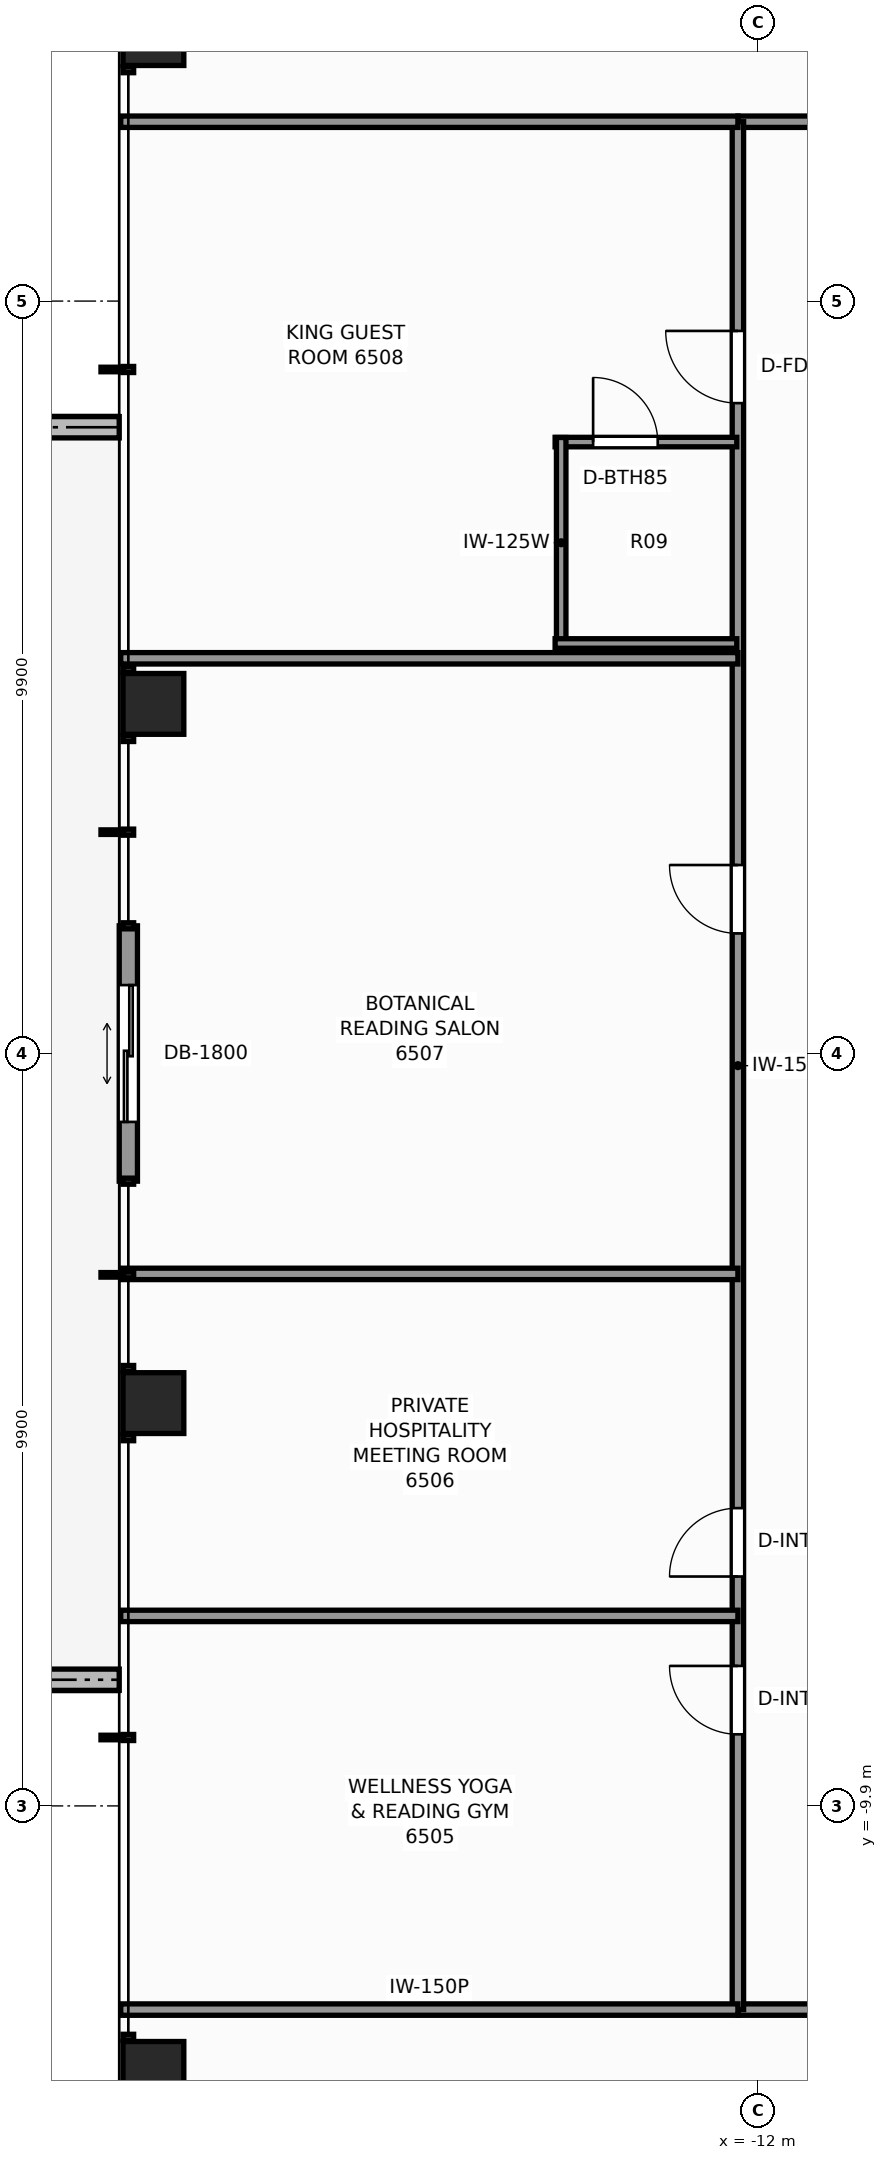
"""IFC4 building model, lengths in metres.
Left out: names, types, materials, properties, quantities, classifications, styles, units other than length and angle.
Written with IfcOpenShell. Run it as: python <this file> out.ifc"""

import sys

from ifc_helpers import new_model, si_unit, direction, frame, frame_2d, origin, origin_2d, place, context, subcontext, project, spatial, rectangle, extrude, element, fill, save


model = new_model("IFC4")
c1 = context("Model", 3, precision=1e-05, world=origin(), true_north=direction((0.0, 1.0)))
c2 = subcontext(c1, "Body", "Model", "MODEL_VIEW")
j1 = project(units=[si_unit("LENGTHUNIT", "METRE"), si_unit("PLANEANGLEUNIT", "RADIAN")], contexts=[c1])
p1 = place(None, origin())
s1 = spatial("IfcSite", under=j1, at=p1, CompositionType="ELEMENT")
p2 = place(p1, origin())
s2 = spatial("IfcBuilding", under=s1, at=p2, CompositionType="ELEMENT")
p3 = place(p2, frame((0.0, 0.0, 222.9)))
s3 = spatial("IfcBuildingStorey", under=s2, at=p3, CompositionType="ELEMENT", Elevation=222.9)
for number, where, z_axis, x_axis in (
    (1, (-19.95, -13.4, 0.0), (0.0, 0.0, 1.0), (1.0, 0.0, 0.0)),
    (2, (-19.95, -4.6, 0.0), (0.0, 0.0, 1.0), (1.0, 0.0, 0.0)),
    (3, (-19.95, 4.6, 0.0), (0.0, 0.0, 1.0), (1.0, 0.0, 0.0)),
    (4, (-19.95, 13.4, 0.0), (0.0, 0.0, 1.0), (1.0, 0.0, 0.0)),
):
    element("IfcColumn", number, at=place(p3, frame(where, z_axis=z_axis, x_axis=x_axis)), inside=s3, PredefinedType="COLUMN", context=c2, shape_type="SweptSolid", body=[
        extrude(rectangle(XDim=0.8, YDim=0.8, at=origin_2d()), origin(), (0.0, 0.0, 1.0), 3.3),
    ])
p4 = place(p3, frame((-21.66, -8.24, -0.04), z_axis=(0.0, 0.0, 1.0), x_axis=(1.0, 0.0, 0.0)))
e5 = element("IfcWall", 5, at=p4, inside=s3, PredefinedType="PARAPET", context=c2, shape_type="SweptSolid", body=[
    extrude(rectangle(XDim=1.26, YDim=0.28, at=frame_2d((0.63, 0.0))), origin(), (0.0, 0.0, 1.0), 0.42),
])
p5 = place(p3, frame((-20.4, 8.24, -0.04), z_axis=(0.0, 0.0, 1.0), x_axis=(-1.0, 0.0, 0.0)))
e6 = element("IfcWall", 6, at=p5, inside=s3, PredefinedType="PARAPET", context=c2, shape_type="SweptSolid", body=[
    extrude(rectangle(XDim=2.006, YDim=0.28, at=frame_2d((1.003, 0.0))), origin(), (0.0, 0.0, 1.0), 0.42),
])
p6 = place(p3, frame((-20.28, -1.68, 0.0), z_axis=(0.0, 0.0, 1.0), x_axis=(0.0, 1.0, 0.0)))
e7 = element("IfcWall", 7, at=p6, inside=s3, PredefinedType="STANDARD", context=c2, shape_type="SweptSolid", body=[
    extrude(rectangle(XDim=3.36, YDim=0.24, at=frame_2d((1.68, 0.0))), origin(), (0.0, 0.0, 1.0), 3.08),
])
p7 = place(p6, frame((0.78, 0.0, 0.0)))
e8 = element("IfcOpeningElement", 8, at=p7, cuts=e7, PredefinedType="OPENING", context=c2, shape_type="SweptSolid", body=[
    extrude(rectangle(XDim=1.8, YDim=2.2, at=frame_2d((0.9, 1.1))), frame((0.0, 0.13, 0.0), z_axis=(0.0, -1.0, 0.0), x_axis=(1.0, 0.0, 0.0)), (0.0, 0.0, 1.0), 0.26),
])
p8 = place(p3, frame((-12.26, -12.58, 0.0), z_axis=(0.0, 0.0, 1.0), x_axis=(1.0, 0.0, 0.0)))
e9 = element("IfcWall", 9, at=p8, inside=s3, PredefinedType="PARTITIONING", context=c2, shape_type="SweptSolid", body=[
    extrude(rectangle(XDim=24.52, YDim=0.15, at=frame_2d((12.26, 0.0))), origin(), (0.0, 0.0, 1.0), 2.369),
])
p9 = place(p8, frame((4.275, 0.0, 0.0)))
e10 = element("IfcOpeningElement", 10, at=p9, cuts=e9, PredefinedType="OPENING", context=c2, shape_type="SweptSolid", body=[
    extrude(rectangle(XDim=0.9, YDim=2.06, at=frame_2d((0.45, 1.03))), frame((0.0, 0.085, 0.0), z_axis=(0.0, -1.0, 0.0), x_axis=(1.0, 0.0, 0.0)), (0.0, 0.0, 1.0), 0.17),
])
p10 = place(p8, frame((19.345, 0.0, 0.0)))
e11 = element("IfcOpeningElement", 11, at=p10, cuts=e9, PredefinedType="OPENING", context=c2, shape_type="SweptSolid", body=[
    extrude(rectangle(XDim=0.9, YDim=2.06, at=frame_2d((0.45, 1.03))), frame((0.0, 0.085, 0.0), z_axis=(0.0, -1.0, 0.0), x_axis=(1.0, 0.0, 0.0)), (0.0, 0.0, 1.0), 0.17),
])
p11 = place(p3, frame((-12.26, 12.26, 0.0), z_axis=(0.0, 0.0, 1.0), x_axis=(1.0, 0.0, 0.0)))
e12 = element("IfcWall", 12, at=p11, inside=s3, PredefinedType="PARTITIONING", context=c2, shape_type="SweptSolid", body=[
    extrude(rectangle(XDim=24.52, YDim=0.15, at=frame_2d((12.26, 0.0))), origin(), (0.0, 0.0, 1.0), 2.369),
])
p12 = place(p11, frame((2.916, 0.0, 0.0)))
e13 = element("IfcOpeningElement", 13, at=p12, cuts=e12, PredefinedType="OPENING", context=c2, shape_type="SweptSolid", body=[
    extrude(rectangle(XDim=0.9, YDim=2.06, at=frame_2d((0.45, 1.03))), frame((0.0, 0.085, 0.0), z_axis=(0.0, -1.0, 0.0), x_axis=(1.0, 0.0, 0.0)), (0.0, 0.0, 1.0), 0.17),
])
p13 = place(p11, frame((9.755, 0.0, 0.0)))
e14 = element("IfcOpeningElement", 14, at=p13, cuts=e12, PredefinedType="OPENING", context=c2, shape_type="SweptSolid", body=[
    extrude(rectangle(XDim=0.95, YDim=2.06, at=frame_2d((0.475, 1.03))), frame((0.0, 0.085, 0.0), z_axis=(0.0, -1.0, 0.0), x_axis=(1.0, 0.0, 0.0)), (0.0, 0.0, 1.0), 0.17),
])
p14 = place(p11, frame((19.345, 0.0, 0.0)))
e15 = element("IfcOpeningElement", 15, at=p14, cuts=e12, PredefinedType="OPENING", context=c2, shape_type="SweptSolid", body=[
    extrude(rectangle(XDim=0.9, YDim=2.06, at=frame_2d((0.45, 1.03))), frame((0.0, 0.085, 0.0), z_axis=(0.0, -1.0, 0.0), x_axis=(1.0, 0.0, 0.0)), (0.0, 0.0, 1.0), 0.17),
])
p15 = place(p3, frame((-12.26, -12.58, 0.0), z_axis=(0.0, 0.0, 1.0), x_axis=(0.0, 1.0, 0.0)))
e16 = element("IfcWall", 16, at=p15, inside=s3, PredefinedType="PARTITIONING", context=c2, shape_type="SweptSolid", body=[
    extrude(rectangle(XDim=24.84, YDim=0.15, at=frame_2d((12.42, 0.0))), origin(), (0.0, 0.0, 1.0), 2.369),
])
p16 = place(p15, frame((3.622, 0.0, 0.0)))
e17 = element("IfcOpeningElement", 17, at=p16, cuts=e16, PredefinedType="OPENING", context=c2, shape_type="SweptSolid", body=[
    extrude(rectangle(XDim=0.9, YDim=2.06, at=frame_2d((0.45, 1.03))), frame((0.0, 0.085, 0.0), z_axis=(0.0, -1.0, 0.0), x_axis=(1.0, 0.0, 0.0)), (0.0, 0.0, 1.0), 0.17),
])
p17 = place(p15, frame((5.698, 0.0, 0.0)))
e18 = element("IfcOpeningElement", 18, at=p17, cuts=e16, PredefinedType="OPENING", context=c2, shape_type="SweptSolid", body=[
    extrude(rectangle(XDim=0.9, YDim=2.06, at=frame_2d((0.45, 1.03))), frame((0.0, 0.085, 0.0), z_axis=(0.0, -1.0, 0.0), x_axis=(1.0, 0.0, 0.0)), (0.0, 0.0, 1.0), 0.17),
])
p18 = place(p15, frame((14.16, 0.0, 0.0)))
e19 = element("IfcOpeningElement", 19, at=p18, cuts=e16, PredefinedType="OPENING", context=c2, shape_type="SweptSolid", body=[
    extrude(rectangle(XDim=0.9, YDim=2.06, at=frame_2d((0.45, 1.03))), frame((0.0, 0.085, 0.0), z_axis=(0.0, -1.0, 0.0), x_axis=(1.0, 0.0, 0.0)), (0.0, 0.0, 1.0), 0.17),
])
p19 = place(p15, frame((21.137, 0.0, 0.0)))
e20 = element("IfcOpeningElement", 20, at=p19, cuts=e16, PredefinedType="OPENING", context=c2, shape_type="SweptSolid", body=[
    extrude(rectangle(XDim=0.95, YDim=2.06, at=frame_2d((0.475, 1.03))), frame((0.0, 0.085, 0.0), z_axis=(0.0, -1.0, 0.0), x_axis=(1.0, 0.0, 0.0)), (0.0, 0.0, 1.0), 0.17),
])
for number, where, z_axis, x_axis in (
    (21, (-20.38, -12.58, 0.0), (0.0, 0.0, 1.0), (1.0, 0.0, 0.0)),
    (22, (-20.38, 12.26, 0.0), (0.0, 0.0, 1.0), (1.0, 0.0, 0.0)),
):
    element("IfcWall", number, at=place(p3, frame(where, z_axis=z_axis, x_axis=x_axis)), inside=s3, PredefinedType="PARTITIONING", context=c2, shape_type="SweptSolid", body=[
        extrude(rectangle(XDim=8.12, YDim=0.15, at=frame_2d((4.06, 0.0))), origin(), (0.0, 0.0, 1.0), 2.369),
    ])
for number, where, z_axis, x_axis in (
    (23, (-20.38, -7.4, 0.0), (0.0, 0.0, 1.0), (1.0, 0.0, 0.0)),
    (24, (-20.38, -2.9, 0.0), (0.0, 0.0, 1.0), (1.0, 0.0, 0.0)),
    (25, (-20.38, 5.2, 0.0), (0.0, 0.0, 1.0), (1.0, 0.0, 0.0)),
):
    element("IfcWall", number, at=place(p3, frame(where, z_axis=z_axis, x_axis=x_axis)), inside=s3, PredefinedType="PARTITIONING", context=c2, shape_type="SweptSolid", body=[
        extrude(rectangle(XDim=8.12, YDim=0.15, at=frame_2d((4.06, 0.0))), origin(), (0.0, 0.0, 1.0), 2.453),
    ])
p20 = place(p3, frame((-14.665, 8.045, 0.0), z_axis=(0.0, 0.0, 1.0), x_axis=(1.0, 0.0, 0.0)))
e26 = element("IfcWall", 26, at=p20, inside=s3, PredefinedType="PARTITIONING", context=c2, shape_type="SweptSolid", body=[
    extrude(rectangle(XDim=2.39, YDim=0.125, at=frame_2d((1.195, 0.0))), origin(), (0.0, 0.0, 1.0), 3.08),
])
p21 = place(p20, frame((0.5, 0.0, 0.0)))
e27 = element("IfcOpeningElement", 27, at=p21, cuts=e26, PredefinedType="OPENING", context=c2, shape_type="SweptSolid", body=[
    extrude(rectangle(XDim=0.85, YDim=2.03, at=frame_2d((0.425, 1.015))), frame((0.0, 0.073, 0.0), z_axis=(0.0, -1.0, 0.0), x_axis=(1.0, 0.0, 0.0)), (0.0, 0.0, 1.0), 0.145),
])
p22 = place(p3, frame((-14.585, 5.335, 0.0), z_axis=(0.0, 0.0, 1.0), x_axis=(0.0, 1.0, 0.0)))
e28 = element("IfcWall", 28, at=p22, inside=s3, PredefinedType="PARTITIONING", context=c2, shape_type="SweptSolid", body=[
    extrude(rectangle(XDim=2.77, YDim=0.125, at=frame_2d((1.385, 0.0))), origin(), (0.0, 0.0, 1.0), 3.08),
])
p23 = place(p3, frame((-14.665, 5.395, 0.0), z_axis=(0.0, 0.0, 1.0), x_axis=(1.0, 0.0, 0.0)))
e29 = element("IfcWall", 29, at=p23, inside=s3, PredefinedType="PARTITIONING", context=c2, shape_type="SweptSolid", body=[
    extrude(rectangle(XDim=2.39, YDim=0.125, at=frame_2d((1.195, 0.0))), origin(), (0.0, 0.0, 1.0), 3.08),
])
p24 = place(p7, origin())
e30 = element("IfcDoor", 30, at=p24, inside=s3, OperationType="DOUBLE_DOOR_SLIDING", PredefinedType="DOOR", context=c2, shape_type="SweptSolid", body=[
    extrude(rectangle(XDim=1.8, YDim=2.2, at=frame_2d((0.9, 1.1))), frame((0.0, 0.025, 0.0), z_axis=(0.0, -1.0, 0.0), x_axis=(1.0, 0.0, 0.0)), (0.0, 0.0, 1.0), 0.05),
])
fill(e8, e30)
p25 = place(p16, origin())
e31 = element("IfcDoor", 31, at=p25, inside=s3, OperationType="SINGLE_SWING_RIGHT", PredefinedType="DOOR", context=c2, shape_type="SweptSolid", body=[
    extrude(rectangle(XDim=0.9, YDim=2.06, at=frame_2d((0.45, 1.03))), frame((0.0, 0.025, 0.0), z_axis=(0.0, -1.0, 0.0), x_axis=(1.0, 0.0, 0.0)), (0.0, 0.0, 1.0), 0.05),
])
fill(e17, e31)
p26 = place(p17, origin())
e32 = element("IfcDoor", 32, at=p26, inside=s3, OperationType="SINGLE_SWING_LEFT", PredefinedType="DOOR", context=c2, shape_type="SweptSolid", body=[
    extrude(rectangle(XDim=0.9, YDim=2.06, at=frame_2d((0.45, 1.03))), frame((0.0, 0.025, 0.0), z_axis=(0.0, -1.0, 0.0), x_axis=(1.0, 0.0, 0.0)), (0.0, 0.0, 1.0), 0.05),
])
fill(e18, e32)
p27 = place(p18, origin())
e33 = element("IfcDoor", 33, at=p27, inside=s3, OperationType="SINGLE_SWING_RIGHT", PredefinedType="DOOR", context=c2, shape_type="SweptSolid", body=[
    extrude(rectangle(XDim=0.9, YDim=2.06, at=frame_2d((0.45, 1.03))), frame((0.0, 0.025, 0.0), z_axis=(0.0, -1.0, 0.0), x_axis=(1.0, 0.0, 0.0)), (0.0, 0.0, 1.0), 0.05),
])
fill(e19, e33)
p28 = place(p21, origin())
e34 = element("IfcDoor", 34, at=p28, inside=s3, OperationType="SINGLE_SWING_LEFT", PredefinedType="DOOR", context=c2, shape_type="SweptSolid", body=[
    extrude(rectangle(XDim=0.85, YDim=2.03, at=frame_2d((0.425, 1.015))), frame((0.0, 0.025, 0.0), z_axis=(0.0, -1.0, 0.0), x_axis=(1.0, 0.0, 0.0)), (0.0, 0.0, 1.0), 0.05),
])
fill(e27, e34)
p29 = place(p19, origin())
e35 = element("IfcDoor", 35, at=p29, inside=s3, OperationType="SINGLE_SWING_RIGHT", PredefinedType="DOOR", context=c2, shape_type="SweptSolid", body=[
    extrude(rectangle(XDim=0.95, YDim=2.06, at=frame_2d((0.475, 1.03))), frame((0.0, 0.025, 0.0), z_axis=(0.0, -1.0, 0.0), x_axis=(1.0, 0.0, 0.0)), (0.0, 0.0, 1.0), 0.05),
])
fill(e20, e35)
save(model, sys.argv[1])
